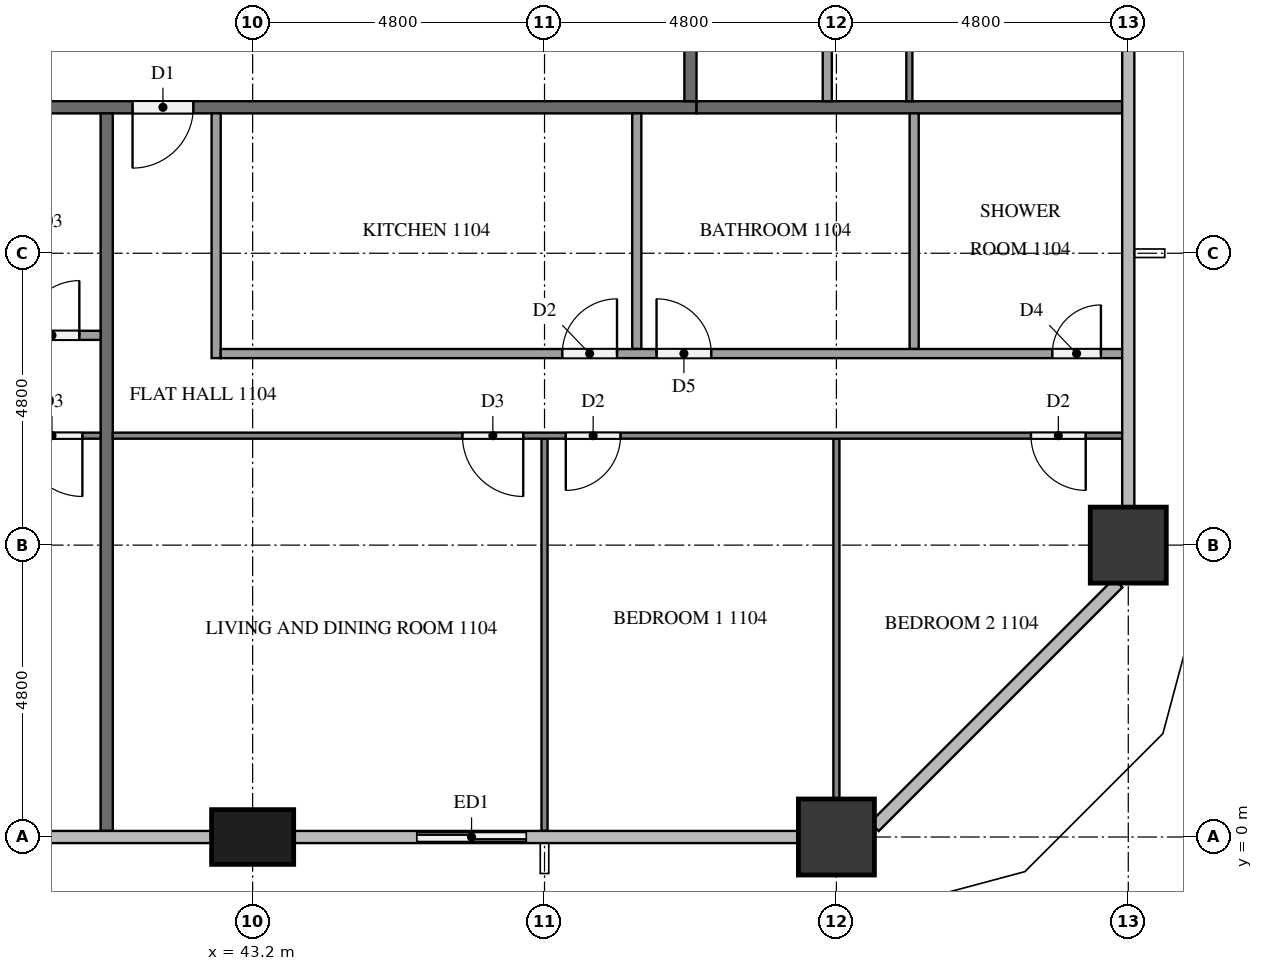
"""IFC4 building model, lengths in metres.
Left out: names, types, materials, properties, quantities, classifications, styles, units other than length and angle.
Written with IfcOpenShell. Run it as: python <this file> out.ifc"""

import sys

from ifc_helpers import new_model, si_unit, direction, frame, frame_2d, origin, origin_2d, place, context, subcontext, project, spatial, rectangle, extrude, element, fill, save


model = new_model("IFC4")
c1 = context("Model", 3, precision=1e-05, world=origin(), true_north=direction((0.0, 1.0)))
c2 = subcontext(c1, "Body", "Model", "MODEL_VIEW")
j1 = project(units=[si_unit("LENGTHUNIT", "METRE"), si_unit("PLANEANGLEUNIT", "RADIAN")], contexts=[c1])
p1 = place(None, origin())
s1 = spatial("IfcSite", under=j1, at=p1, CompositionType="ELEMENT")
p2 = place(p1, origin())
s2 = spatial("IfcBuilding", under=s1, at=p2, CompositionType="ELEMENT")
p3 = place(p2, frame((0.0, 0.0, 46.9)))
s3 = spatial("IfcBuildingStorey", under=s2, at=p3, CompositionType="ELEMENT", Elevation=46.9)
p4 = place(p3, frame((43.2, 0.0, 0.0), z_axis=(0.0, 0.0, 1.0), x_axis=(1.0, 0.0, 0.0)))
e1 = element("IfcColumn", 1, at=p4, inside=s3, PredefinedType="COLUMN", context=c2, shape_type="SweptSolid", body=[
    extrude(rectangle(XDim=1.35, YDim=0.9, at=origin_2d()), origin(), (0.0, 0.0, 1.0), 3.2),
])
for number, where, z_axis, x_axis in (
    (2, (52.8, 0.0, 0.0), (0.0, 0.0, 1.0), (1.0, 0.0, 0.0)),
    (3, (57.6, 4.8, 0.0), (0.0, 0.0, 1.0), (1.0, 0.0, 0.0)),
):
    element("IfcColumn", number, at=place(p3, frame(where, z_axis=z_axis, x_axis=x_axis)), inside=s3, PredefinedType="COLUMN", context=c2, shape_type="SweptSolid", body=[
        extrude(rectangle(XDim=1.25, YDim=1.25, at=origin_2d()), origin(), (0.0, 0.0, 1.0), 3.2),
    ])
p5 = place(p3, frame((45.6, 0.0, 0.0), z_axis=(0.0, 0.0, 1.0), x_axis=(1.0, 0.0, 0.0)))
e4 = element("IfcWall", 4, at=p5, inside=s3, PredefinedType="SOLIDWALL", context=c2, shape_type="SweptSolid", body=[
    extrude(rectangle(XDim=2.4, YDim=0.15, at=frame_2d((1.2, 0.0))), origin(), (0.0, 0.0, 1.0), 3.2),
])
p6 = place(p5, frame((0.3, 0.0, 0.0)))
e5 = element("IfcOpeningElement", 5, at=p6, cuts=e4, PredefinedType="OPENING", context=c2, shape_type="SweptSolid", body=[
    extrude(rectangle(XDim=1.8, YDim=2.4, at=frame_2d((0.9, 1.2))), frame((0.0, 0.085, 0.0), z_axis=(0.0, -1.0, 0.0), x_axis=(1.0, 0.0, 0.0)), (0.0, 0.0, 1.0), 0.17),
])
p7 = place(p3, frame((50.5, 12.0, 0.0), z_axis=(0.0, 0.0, 1.0), x_axis=(-1.0, 0.0, 0.0)))
e6 = element("IfcWall", 6, at=p7, inside=s3, PredefinedType="PARTITIONING", context=c2, shape_type="SweptSolid", body=[
    extrude(rectangle(XDim=38.6, YDim=0.2, at=frame_2d((19.3, 0.0))), origin(), (0.0, 0.0, 1.0), 3.2),
])
p8 = place(p7, frame((36.525, 0.0, 0.0)))
e7 = element("IfcOpeningElement", 7, at=p8, cuts=e6, PredefinedType="OPENING", context=c2, shape_type="SweptSolid", body=[
    extrude(rectangle(XDim=1.0, YDim=2.1, at=frame_2d((0.5, 1.05))), frame((0.0, 0.11, 0.0), z_axis=(0.0, -1.0, 0.0), x_axis=(1.0, 0.0, 0.0)), (0.0, 0.0, 1.0), 0.22),
])
p9 = place(p7, frame((24.525, 0.0, 0.0)))
e8 = element("IfcOpeningElement", 8, at=p9, cuts=e6, PredefinedType="OPENING", context=c2, shape_type="SweptSolid", body=[
    extrude(rectangle(XDim=1.0, YDim=2.1, at=frame_2d((0.5, 1.05))), frame((0.0, 0.11, 0.0), z_axis=(0.0, -1.0, 0.0), x_axis=(1.0, 0.0, 0.0)), (0.0, 0.0, 1.0), 0.22),
])
p10 = place(p7, frame((22.675, 0.0, 0.0)))
e9 = element("IfcOpeningElement", 9, at=p10, cuts=e6, PredefinedType="OPENING", context=c2, shape_type="SweptSolid", body=[
    extrude(rectangle(XDim=1.0, YDim=2.1, at=frame_2d((0.5, 1.05))), frame((0.0, 0.11, 0.0), z_axis=(0.0, -1.0, 0.0), x_axis=(1.0, 0.0, 0.0)), (0.0, 0.0, 1.0), 0.22),
])
p11 = place(p7, frame((8.275, 0.0, 0.0)))
e10 = element("IfcOpeningElement", 10, at=p11, cuts=e6, PredefinedType="OPENING", context=c2, shape_type="SweptSolid", body=[
    extrude(rectangle(XDim=1.0, YDim=2.1, at=frame_2d((0.5, 1.05))), frame((0.0, 0.11, 0.0), z_axis=(0.0, -1.0, 0.0), x_axis=(1.0, 0.0, 0.0)), (0.0, 0.0, 1.0), 0.22),
])
p12 = place(p3, frame((50.4, 40.7, 0.0), z_axis=(0.0, 0.0, 1.0), x_axis=(0.0, -1.0, 0.0)))
e11 = element("IfcWall", 11, at=p12, inside=s3, PredefinedType="PARTITIONING", context=c2, shape_type="SweptSolid", body=[
    extrude(rectangle(XDim=28.6, YDim=0.2, at=frame_2d((14.3, 0.0))), origin(), (0.0, 0.0, 1.0), 3.2),
])
p13 = place(p12, frame((17.125, 0.0, 0.0)))
e12 = element("IfcOpeningElement", 12, at=p13, cuts=e11, PredefinedType="OPENING", context=c2, shape_type="SweptSolid", body=[
    extrude(rectangle(XDim=1.0, YDim=2.1, at=frame_2d((0.5, 1.05))), frame((0.0, 0.11, 0.0), z_axis=(0.0, -1.0, 0.0), x_axis=(1.0, 0.0, 0.0)), (0.0, 0.0, 1.0), 0.22),
])
p14 = place(p12, frame((15.275, 0.0, 0.0)))
e13 = element("IfcOpeningElement", 13, at=p14, cuts=e11, PredefinedType="OPENING", context=c2, shape_type="SweptSolid", body=[
    extrude(rectangle(XDim=1.0, YDim=2.1, at=frame_2d((0.5, 1.05))), frame((0.0, 0.11, 0.0), z_axis=(0.0, -1.0, 0.0), x_axis=(1.0, 0.0, 0.0)), (0.0, 0.0, 1.0), 0.22),
])
p15 = place(p12, frame((5.675, 0.0, 0.0)))
e14 = element("IfcOpeningElement", 14, at=p15, cuts=e11, PredefinedType="OPENING", context=c2, shape_type="SweptSolid", body=[
    extrude(rectangle(XDim=1.0, YDim=2.1, at=frame_2d((0.5, 1.05))), frame((0.0, 0.11, 0.0), z_axis=(0.0, -1.0, 0.0), x_axis=(1.0, 0.0, 0.0)), (0.0, 0.0, 1.0), 0.22),
])
p16 = place(p3, frame((40.8, 11.9, 0.0), z_axis=(0.0, 0.0, 1.0), x_axis=(0.0, -1.0, 0.0)))
e15 = element("IfcWall", 15, at=p16, inside=s3, PredefinedType="PARTITIONING", context=c2, shape_type="SweptSolid", body=[
    extrude(rectangle(XDim=11.8, YDim=0.2, at=frame_2d((5.9, 0.0))), origin(), (0.0, 0.0, 1.0), 3.2),
])
p17 = place(p3, frame((50.5, 12.0, 0.0), z_axis=(0.0, 0.0, 1.0), x_axis=(1.0, 0.0, 0.0)))
e16 = element("IfcWall", 16, at=p17, inside=s3, PredefinedType="PARTITIONING", context=c2, shape_type="SweptSolid", body=[
    extrude(rectangle(XDim=7.0, YDim=0.2, at=frame_2d((3.5, 0.0))), origin(), (0.0, 0.0, 1.0), 3.2),
])
p18 = place(p3, frame((40.7, 6.6, 0.0), z_axis=(0.0, 0.0, 1.0), x_axis=(-1.0, 0.0, 0.0)))
e17 = element("IfcWall", 17, at=p18, inside=s3, PredefinedType="PARTITIONING", context=c2, shape_type="SweptSolid", body=[
    extrude(rectangle(XDim=14.2, YDim=0.1, at=frame_2d((7.1, 0.0))), origin(), (0.0, 0.0, 1.0), 3.2),
])
p19 = place(p18, frame((9.85, 0.0, 0.0)))
e18 = element("IfcOpeningElement", 18, at=p19, cuts=e17, PredefinedType="OPENING", context=c2, shape_type="SweptSolid", body=[
    extrude(rectangle(XDim=0.9, YDim=2.1, at=frame_2d((0.45, 1.05))), frame((0.0, 0.06, 0.0), z_axis=(0.0, -1.0, 0.0), x_axis=(1.0, 0.0, 0.0)), (0.0, 0.0, 1.0), 0.12),
])
p20 = place(p18, frame((8.25, 0.0, 0.0)))
e19 = element("IfcOpeningElement", 19, at=p20, cuts=e17, PredefinedType="OPENING", context=c2, shape_type="SweptSolid", body=[
    extrude(rectangle(XDim=0.9, YDim=2.1, at=frame_2d((0.45, 1.05))), frame((0.0, 0.06, 0.0), z_axis=(0.0, -1.0, 0.0), x_axis=(1.0, 0.0, 0.0)), (0.0, 0.0, 1.0), 0.12),
])
p21 = place(p18, frame((0.3, 0.0, 0.0)))
e20 = element("IfcOpeningElement", 20, at=p21, cuts=e17, PredefinedType="OPENING", context=c2, shape_type="SweptSolid", body=[
    extrude(rectangle(XDim=1.0, YDim=2.1, at=frame_2d((0.5, 1.05))), frame((0.0, 0.06, 0.0), z_axis=(0.0, -1.0, 0.0), x_axis=(1.0, 0.0, 0.0)), (0.0, 0.0, 1.0), 0.12),
])
p22 = place(p3, frame((28.275, 8.25, 0.0), z_axis=(0.0, 0.0, 1.0), x_axis=(1.0, 0.0, 0.0)))
e21 = element("IfcWall", 21, at=p22, inside=s3, PredefinedType="PARTITIONING", context=c2, shape_type="SweptSolid", body=[
    extrude(rectangle(XDim=12.425, YDim=0.15, at=frame_2d((6.212, 0.0))), origin(), (0.0, 0.0, 1.0), 3.2),
])
p23 = place(p22, frame((4.51, 0.0, 0.0)))
e22 = element("IfcOpeningElement", 22, at=p23, cuts=e21, PredefinedType="OPENING", context=c2, shape_type="SweptSolid", body=[
    extrude(rectangle(XDim=0.9, YDim=2.1, at=frame_2d((0.45, 1.05))), frame((0.0, 0.085, 0.0), z_axis=(0.0, -1.0, 0.0), x_axis=(1.0, 0.0, 0.0)), (0.0, 0.0, 1.0), 0.17),
])
p24 = place(p22, frame((6.06, 0.0, 0.0)))
e23 = element("IfcOpeningElement", 23, at=p24, cuts=e21, PredefinedType="OPENING", context=c2, shape_type="SweptSolid", body=[
    extrude(rectangle(XDim=0.8, YDim=2.1, at=frame_2d((0.4, 1.05))), frame((0.0, 0.085, 0.0), z_axis=(0.0, -1.0, 0.0), x_axis=(1.0, 0.0, 0.0)), (0.0, 0.0, 1.0), 0.17),
])
p25 = place(p22, frame((11.175, 0.0, 0.0)))
e24 = element("IfcOpeningElement", 24, at=p25, cuts=e21, PredefinedType="OPENING", context=c2, shape_type="SweptSolid", body=[
    extrude(rectangle(XDim=0.9, YDim=2.1, at=frame_2d((0.45, 1.05))), frame((0.0, 0.085, 0.0), z_axis=(0.0, -1.0, 0.0), x_axis=(1.0, 0.0, 0.0)), (0.0, 0.0, 1.0), 0.17),
])
p26 = place(p3, frame((48.0, 6.55, 0.0), z_axis=(0.0, 0.0, 1.0), x_axis=(0.0, -1.0, 0.0)))
e25 = element("IfcWall", 25, at=p26, inside=s3, PredefinedType="PARTITIONING", context=c2, shape_type="SweptSolid", body=[
    extrude(rectangle(XDim=6.45, YDim=0.1, at=frame_2d((3.225, 0.0))), origin(), (0.0, 0.0, 1.0), 3.2),
])
p27 = place(p3, frame((52.8, 6.55, 0.0), z_axis=(0.0, 0.0, 1.0), x_axis=(0.0, -1.0, 0.0)))
e26 = element("IfcWall", 26, at=p27, inside=s3, PredefinedType="PARTITIONING", context=c2, shape_type="SweptSolid", body=[
    extrude(rectangle(XDim=5.925, YDim=0.1, at=frame_2d((2.962, 0.0))), origin(), (0.0, 0.0, 1.0), 3.2),
])
p28 = place(p3, frame((57.5, 6.6, 0.0), z_axis=(0.0, 0.0, 1.0), x_axis=(-1.0, 0.0, 0.0)))
e27 = element("IfcWall", 27, at=p28, inside=s3, PredefinedType="PARTITIONING", context=c2, shape_type="SweptSolid", body=[
    extrude(rectangle(XDim=16.6, YDim=0.1, at=frame_2d((8.3, 0.0))), origin(), (0.0, 0.0, 1.0), 3.2),
])
p29 = place(p28, frame((9.85, 0.0, 0.0)))
e28 = element("IfcOpeningElement", 28, at=p29, cuts=e27, PredefinedType="OPENING", context=c2, shape_type="SweptSolid", body=[
    extrude(rectangle(XDim=1.0, YDim=2.1, at=frame_2d((0.5, 1.05))), frame((0.0, 0.06, 0.0), z_axis=(0.0, -1.0, 0.0), x_axis=(1.0, 0.0, 0.0)), (0.0, 0.0, 1.0), 0.12),
])
p30 = place(p28, frame((8.25, 0.0, 0.0)))
e29 = element("IfcOpeningElement", 29, at=p30, cuts=e27, PredefinedType="OPENING", context=c2, shape_type="SweptSolid", body=[
    extrude(rectangle(XDim=0.9, YDim=2.1, at=frame_2d((0.45, 1.05))), frame((0.0, 0.06, 0.0), z_axis=(0.0, -1.0, 0.0), x_axis=(1.0, 0.0, 0.0)), (0.0, 0.0, 1.0), 0.12),
])
p31 = place(p28, frame((0.6, 0.0, 0.0)))
e30 = element("IfcOpeningElement", 30, at=p31, cuts=e27, PredefinedType="OPENING", context=c2, shape_type="SweptSolid", body=[
    extrude(rectangle(XDim=0.9, YDim=2.1, at=frame_2d((0.45, 1.05))), frame((0.0, 0.06, 0.0), z_axis=(0.0, -1.0, 0.0), x_axis=(1.0, 0.0, 0.0)), (0.0, 0.0, 1.0), 0.12),
])
for number, where, z_axis, x_axis in (
    (31, (49.517, 11.9, 0.0), (0.0, 0.0, 1.0), (0.0, -1.0, 0.0)),
    (32, (54.079, 11.9, 0.0), (0.0, 0.0, 1.0), (0.0, -1.0, 0.0)),
):
    element("IfcWall", number, at=place(p3, frame(where, z_axis=z_axis, x_axis=x_axis)), inside=s3, PredefinedType="PARTITIONING", context=c2, shape_type="SweptSolid", body=[
        extrude(rectangle(XDim=3.875, YDim=0.15, at=frame_2d((1.938, 0.0))), origin(), (0.0, 0.0, 1.0), 3.2),
    ])
p32 = place(p3, frame((42.6, 11.9, 0.0), z_axis=(0.0, 0.0, 1.0), x_axis=(0.0, -1.0, 0.0)))
e33 = element("IfcWall", 33, at=p32, inside=s3, PredefinedType="PARTITIONING", context=c2, shape_type="SweptSolid", body=[
    extrude(rectangle(XDim=4.025, YDim=0.15, at=frame_2d((2.012, 0.0))), origin(), (0.0, 0.0, 1.0), 3.2),
])
p33 = place(p3, frame((42.675, 7.95, 0.0), z_axis=(0.0, 0.0, 1.0), x_axis=(1.0, 0.0, 0.0)))
e34 = element("IfcWall", 34, at=p33, inside=s3, PredefinedType="PARTITIONING", context=c2, shape_type="SweptSolid", body=[
    extrude(rectangle(XDim=14.825, YDim=0.15, at=frame_2d((7.413, 0.0))), origin(), (0.0, 0.0, 1.0), 3.2),
])
p34 = place(p33, frame((5.617, 0.0, 0.0)))
e35 = element("IfcOpeningElement", 35, at=p34, cuts=e34, PredefinedType="OPENING", context=c2, shape_type="SweptSolid", body=[
    extrude(rectangle(XDim=0.9, YDim=2.1, at=frame_2d((0.45, 1.05))), frame((0.0, 0.085, 0.0), z_axis=(0.0, -1.0, 0.0), x_axis=(1.0, 0.0, 0.0)), (0.0, 0.0, 1.0), 0.17),
])
p35 = place(p33, frame((7.167, 0.0, 0.0)))
e36 = element("IfcOpeningElement", 36, at=p35, cuts=e34, PredefinedType="OPENING", context=c2, shape_type="SweptSolid", body=[
    extrude(rectangle(XDim=0.9, YDim=2.1, at=frame_2d((0.45, 1.05))), frame((0.0, 0.085, 0.0), z_axis=(0.0, -1.0, 0.0), x_axis=(1.0, 0.0, 0.0)), (0.0, 0.0, 1.0), 0.17),
])
p36 = place(p33, frame((13.675, 0.0, 0.0)))
e37 = element("IfcOpeningElement", 37, at=p36, cuts=e34, PredefinedType="OPENING", context=c2, shape_type="SweptSolid", body=[
    extrude(rectangle(XDim=0.8, YDim=2.1, at=frame_2d((0.4, 1.05))), frame((0.0, 0.085, 0.0), z_axis=(0.0, -1.0, 0.0), x_axis=(1.0, 0.0, 0.0)), (0.0, 0.0, 1.0), 0.17),
])
p37 = place(p3, frame((54.0, 23.9, 0.0), z_axis=(0.0, 0.0, 1.0), x_axis=(0.0, -1.0, 0.0)))
e38 = element("IfcWall", 38, at=p37, inside=s3, PredefinedType="PARTITIONING", context=c2, shape_type="SweptSolid", body=[
    extrude(rectangle(XDim=11.8, YDim=0.1, at=frame_2d((5.9, 0.0))), origin(), (0.0, 0.0, 1.0), 3.2),
])
p38 = place(p37, frame((5.75, 0.0, 0.0)))
e39 = element("IfcOpeningElement", 39, at=p38, cuts=e38, PredefinedType="OPENING", context=c2, shape_type="SweptSolid", body=[
    extrude(rectangle(XDim=1.0, YDim=2.1, at=frame_2d((0.5, 1.05))), frame((0.0, 0.06, 0.0), z_axis=(0.0, -1.0, 0.0), x_axis=(1.0, 0.0, 0.0)), (0.0, 0.0, 1.0), 0.12),
])
p39 = place(p37, frame((7.45, 0.0, 0.0)))
e40 = element("IfcOpeningElement", 40, at=p39, cuts=e38, PredefinedType="OPENING", context=c2, shape_type="SweptSolid", body=[
    extrude(rectangle(XDim=0.9, YDim=2.1, at=frame_2d((0.45, 1.05))), frame((0.0, 0.06, 0.0), z_axis=(0.0, -1.0, 0.0), x_axis=(1.0, 0.0, 0.0)), (0.0, 0.0, 1.0), 0.12),
])
p40 = place(p3, frame((52.65, 12.1, 0.0), z_axis=(0.0, 0.0, 1.0), x_axis=(0.0, 1.0, 0.0)))
e41 = element("IfcWall", 41, at=p40, inside=s3, PredefinedType="PARTITIONING", context=c2, shape_type="SweptSolid", body=[
    extrude(rectangle(XDim=10.025, YDim=0.15, at=frame_2d((5.012, 0.0))), origin(), (0.0, 0.0, 1.0), 3.2),
])
p41 = place(p40, frame((6.34, 0.0, 0.0)))
e42 = element("IfcOpeningElement", 42, at=p41, cuts=e41, PredefinedType="OPENING", context=c2, shape_type="SweptSolid", body=[
    extrude(rectangle(XDim=0.8, YDim=2.1, at=frame_2d((0.4, 1.05))), frame((0.0, 0.085, 0.0), z_axis=(0.0, -1.0, 0.0), x_axis=(1.0, 0.0, 0.0)), (0.0, 0.0, 1.0), 0.17),
])
p42 = place(p40, frame((4.79, 0.0, 0.0)))
e43 = element("IfcOpeningElement", 43, at=p42, cuts=e41, PredefinedType="OPENING", context=c2, shape_type="SweptSolid", body=[
    extrude(rectangle(XDim=0.9, YDim=2.1, at=frame_2d((0.45, 1.05))), frame((0.0, 0.085, 0.0), z_axis=(0.0, -1.0, 0.0), x_axis=(1.0, 0.0, 0.0)), (0.0, 0.0, 1.0), 0.17),
])
p43 = place(p6, origin())
e44 = element("IfcDoor", 44, at=p43, inside=s3, OperationType="SLIDING_TO_LEFT", PredefinedType="DOOR", context=c2, shape_type="SweptSolid", body=[
    extrude(rectangle(XDim=1.8, YDim=2.4, at=frame_2d((0.9, 1.2))), frame((0.0, 0.025, 0.0), z_axis=(0.0, -1.0, 0.0), x_axis=(1.0, 0.0, 0.0)), (0.0, 0.0, 1.0), 0.05),
])
fill(e5, e44)
p44 = place(p11, origin())
e45 = element("IfcDoor", 45, at=p44, inside=s3, OperationType="SINGLE_SWING_RIGHT", PredefinedType="DOOR", context=c2, shape_type="SweptSolid", body=[
    extrude(rectangle(XDim=1.0, YDim=2.1, at=frame_2d((0.5, 1.05))), frame((0.0, 0.025, 0.0), z_axis=(0.0, -1.0, 0.0), x_axis=(1.0, 0.0, 0.0)), (0.0, 0.0, 1.0), 0.05),
])
fill(e10, e45)
p45 = place(p21, origin())
e46 = element("IfcDoor", 46, at=p45, inside=s3, OperationType="SINGLE_SWING_LEFT", PredefinedType="DOOR", context=c2, shape_type="SweptSolid", body=[
    extrude(rectangle(XDim=1.0, YDim=2.1, at=frame_2d((0.5, 1.05))), frame((0.0, 0.025, 0.0), z_axis=(0.0, -1.0, 0.0), x_axis=(1.0, 0.0, 0.0)), (0.0, 0.0, 1.0), 0.05),
])
fill(e20, e46)
p46 = place(p25, origin())
e47 = element("IfcDoor", 47, at=p46, inside=s3, OperationType="SINGLE_SWING_RIGHT", PredefinedType="DOOR", context=c2, shape_type="SweptSolid", body=[
    extrude(rectangle(XDim=0.9, YDim=2.1, at=frame_2d((0.45, 1.05))), frame((0.0, 0.025, 0.0), z_axis=(0.0, -1.0, 0.0), x_axis=(1.0, 0.0, 0.0)), (0.0, 0.0, 1.0), 0.05),
])
fill(e24, e47)
p47 = place(p29, origin())
e48 = element("IfcDoor", 48, at=p47, inside=s3, OperationType="SINGLE_SWING_LEFT", PredefinedType="DOOR", context=c2, shape_type="SweptSolid", body=[
    extrude(rectangle(XDim=1.0, YDim=2.1, at=frame_2d((0.5, 1.05))), frame((0.0, 0.025, 0.0), z_axis=(0.0, -1.0, 0.0), x_axis=(1.0, 0.0, 0.0)), (0.0, 0.0, 1.0), 0.05),
])
fill(e28, e48)
p48 = place(p30, origin())
e49 = element("IfcDoor", 49, at=p48, inside=s3, OperationType="SINGLE_SWING_RIGHT", PredefinedType="DOOR", context=c2, shape_type="SweptSolid", body=[
    extrude(rectangle(XDim=0.9, YDim=2.1, at=frame_2d((0.45, 1.05))), frame((0.0, 0.025, 0.0), z_axis=(0.0, -1.0, 0.0), x_axis=(1.0, 0.0, 0.0)), (0.0, 0.0, 1.0), 0.05),
])
fill(e29, e49)
p49 = place(p31, origin())
e50 = element("IfcDoor", 50, at=p49, inside=s3, OperationType="SINGLE_SWING_LEFT", PredefinedType="DOOR", context=c2, shape_type="SweptSolid", body=[
    extrude(rectangle(XDim=0.9, YDim=2.1, at=frame_2d((0.45, 1.05))), frame((0.0, 0.025, 0.0), z_axis=(0.0, -1.0, 0.0), x_axis=(1.0, 0.0, 0.0)), (0.0, 0.0, 1.0), 0.05),
])
fill(e30, e50)
p50 = place(p34, origin())
e51 = element("IfcDoor", 51, at=p50, inside=s3, OperationType="SINGLE_SWING_RIGHT", PredefinedType="DOOR", context=c2, shape_type="SweptSolid", body=[
    extrude(rectangle(XDim=0.9, YDim=2.1, at=frame_2d((0.45, 1.05))), frame((0.0, 0.025, 0.0), z_axis=(0.0, -1.0, 0.0), x_axis=(1.0, 0.0, 0.0)), (0.0, 0.0, 1.0), 0.05),
])
fill(e35, e51)
p51 = place(p35, origin())
e52 = element("IfcDoor", 52, at=p51, inside=s3, OperationType="SINGLE_SWING_LEFT", PredefinedType="DOOR", context=c2, shape_type="SweptSolid", body=[
    extrude(rectangle(XDim=0.9, YDim=2.1, at=frame_2d((0.45, 1.05))), frame((0.0, 0.025, 0.0), z_axis=(0.0, -1.0, 0.0), x_axis=(1.0, 0.0, 0.0)), (0.0, 0.0, 1.0), 0.05),
])
fill(e36, e52)
p52 = place(p36, origin())
e53 = element("IfcDoor", 53, at=p52, inside=s3, OperationType="SINGLE_SWING_RIGHT", PredefinedType="DOOR", context=c2, shape_type="SweptSolid", body=[
    extrude(rectangle(XDim=0.8, YDim=2.1, at=frame_2d((0.4, 1.05))), frame((0.0, 0.025, 0.0), z_axis=(0.0, -1.0, 0.0), x_axis=(1.0, 0.0, 0.0)), (0.0, 0.0, 1.0), 0.05),
])
fill(e37, e53)
save(model, sys.argv[1])
